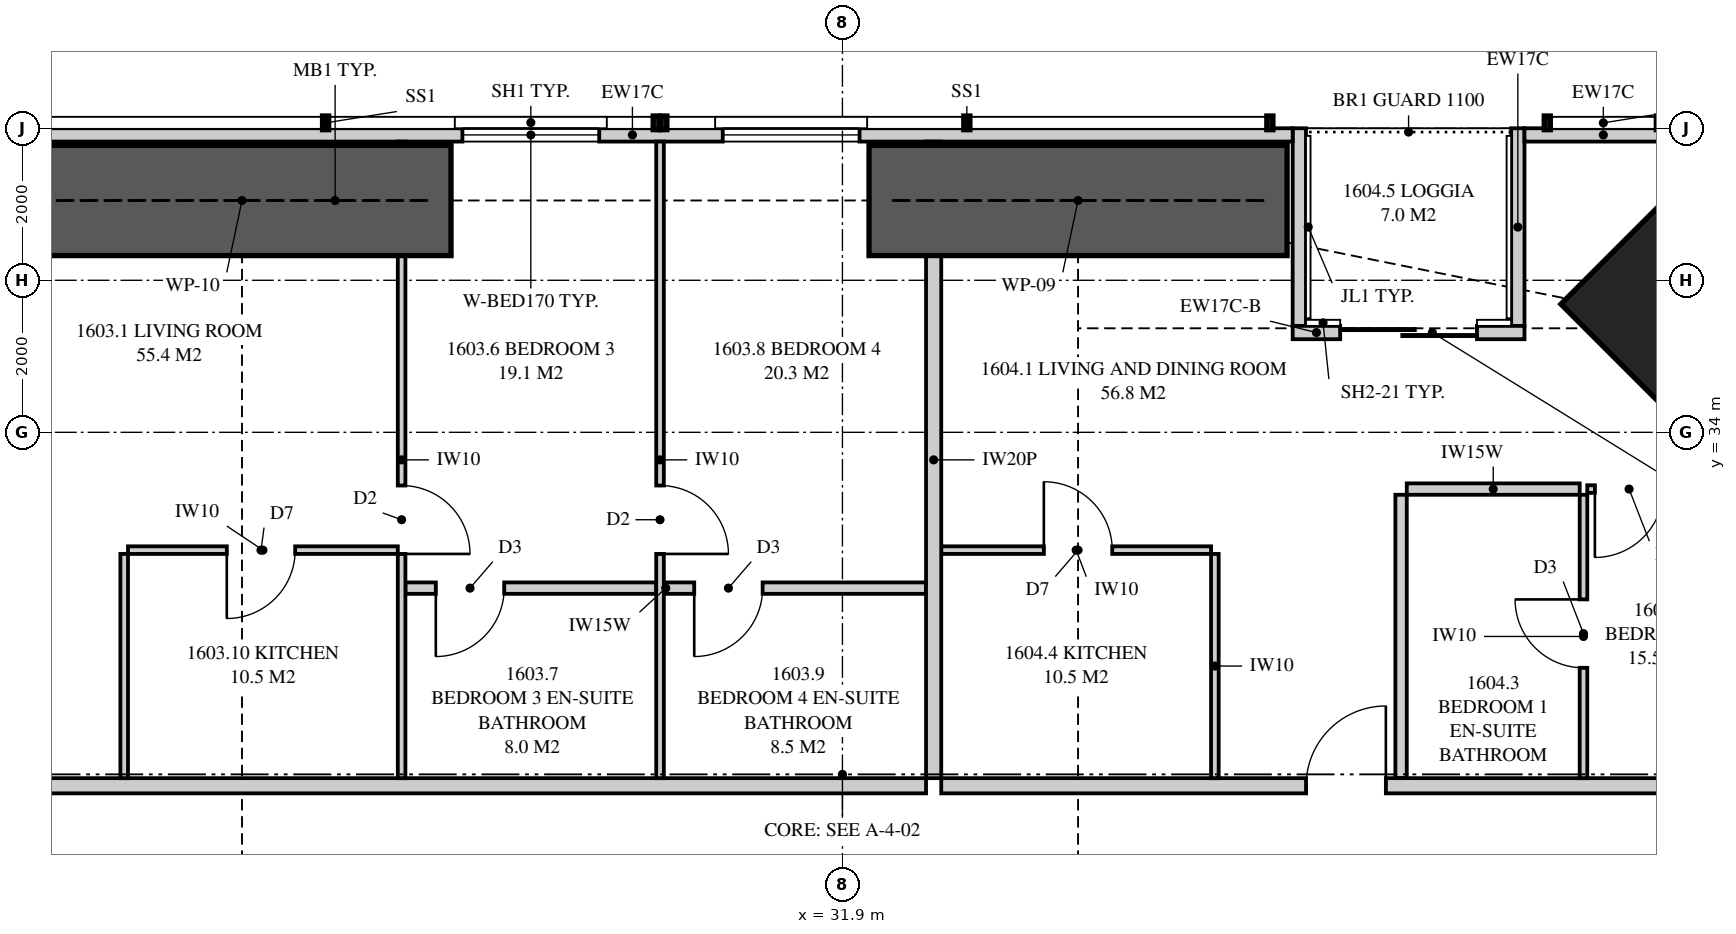
"""IFC4 building model, lengths in metres.
Left out: names, types, materials, properties, quantities, classifications, styles, units other than length and angle.
Written with IfcOpenShell. Run it as: python <this file> out.ifc"""

import sys

from ifc_helpers import new_model, si_unit, direction, frame, frame_2d, origin, origin_2d, place, context, subcontext, project, spatial, polyline, rectangle, outline, extrude, element, fill, save


model = new_model("IFC4")
c1 = context("Model", 3, precision=1e-05, world=origin(), true_north=direction((0.0, 1.0)))
c2 = subcontext(c1, "Body", "Model", "MODEL_VIEW")
j1 = project(units=[si_unit("LENGTHUNIT", "METRE"), si_unit("PLANEANGLEUNIT", "RADIAN")], contexts=[c1])
p1 = place(None, origin())
s1 = spatial("IfcSite", under=j1, at=p1, CompositionType="ELEMENT")
p2 = place(p1, origin())
s2 = spatial("IfcBuilding", under=s1, at=p2, CompositionType="ELEMENT")
p3 = place(p2, frame((0.0, 0.0, 61.2)))
s3 = spatial("IfcBuildingStorey", under=s2, at=p3, CompositionType="ELEMENT", Elevation=61.2)
p4 = place(p3, frame((43.369, 35.369, 0.0), z_axis=(0.0, 0.0, 1.0), x_axis=(-0.707106781187, -0.707106781187, 0.0)))
e1 = element("IfcColumn", 1, at=p4, inside=s3, PredefinedType="COLUMN", context=c2, shape_type="SweptSolid", body=[
    extrude(rectangle(XDim=2.4, YDim=3.3, at=origin_2d()), origin(), (0.0, 0.0, 1.0), 3.35),
])
p5 = place(p3, frame((42.949, 37.913, 0.0), z_axis=(0.0, 0.0, 1.0), x_axis=(-1.0, 0.0, 0.0)))
e2 = element("IfcWall", 2, at=p5, inside=s3, PredefinedType="SOLIDWALL", context=c2, shape_type="SweptSolid", body=[
    extrude(rectangle(XDim=2.075, YDim=0.175, at=frame_2d((1.038, 0.0))), origin(), (0.0, 0.0, 1.0), 3.11),
])
p6 = place(p3, frame((37.824, 37.913, 0.0), z_axis=(0.0, 0.0, 1.0), x_axis=(-1.0, 0.0, 0.0)))
e3 = element("IfcWall", 3, at=p6, inside=s3, PredefinedType="SOLIDWALL", context=c2, shape_type="SweptSolid", body=[
    extrude(outline(polyline([(0.0, 0.0), (17.374, 0.0), (17.374, 2.15), (2.824, 2.15), (2.824, 3.11), (2.668, 3.11), (2.668, 2.15), (2.62, 2.15), (2.62, 3.11), (0.0, 3.11), (0.0, 0.0)])), frame((0.0, 0.087, 0.0), z_axis=(0.0, -1.0, 0.0), x_axis=(1.0, 0.0, 0.0)), (0.0, 0.0, 1.0), 0.175),
])
p7 = place(p6, frame((5.699, 0.0, 0.4)))
e4 = element("IfcOpeningElement", 4, at=p7, cuts=e3, PredefinedType="OPENING", context=c2, shape_type="SweptSolid", body=[
    extrude(rectangle(XDim=1.8, YDim=1.7, at=frame_2d((0.9, 0.85))), frame((0.0, 0.097, 0.0), z_axis=(0.0, -1.0, 0.0), x_axis=(1.0, 0.0, 0.0)), (0.0, 0.0, 1.0), 0.195),
])
p8 = place(p6, frame((9.124, 0.0, 0.4)))
e5 = element("IfcOpeningElement", 5, at=p8, cuts=e3, PredefinedType="OPENING", context=c2, shape_type="SweptSolid", body=[
    extrude(rectangle(XDim=1.8, YDim=1.7, at=frame_2d((0.9, 0.85))), frame((0.0, 0.097, 0.0), z_axis=(0.0, -1.0, 0.0), x_axis=(1.0, 0.0, 0.0)), (0.0, 0.0, 1.0), 0.195),
])
p9 = place(p3, frame((40.874, 35.312, 0.0), z_axis=(0.0, 0.0, 1.0), x_axis=(-1.0, 0.0, 0.0)))
e6 = element("IfcWall", 6, at=p9, inside=s3, PredefinedType="SOLIDWALL", context=c2, shape_type="SweptSolid", body=[
    extrude(rectangle(XDim=2.425, YDim=0.175, at=frame_2d((1.212, 0.0))), origin(), (0.0, 0.0, 1.0), 2.15),
])
p10 = place(p9, frame((0.625, 0.0, 0.0)))
e7 = element("IfcOpeningElement", 7, at=p10, cuts=e6, PredefinedType="OPENING", context=c2, shape_type="SweptSolid", body=[
    extrude(rectangle(XDim=1.8, YDim=2.1, at=frame_2d((0.9, 1.05))), frame((0.0, 0.097, 0.0), z_axis=(0.0, -1.0, 0.0), x_axis=(1.0, 0.0, 0.0)), (0.0, 0.0, 1.0), 0.195),
])
p11 = place(p3, frame((38.449, 35.312, 0.0), z_axis=(0.0, 0.0, 1.0), x_axis=(-1.0, 0.0, 0.0)))
e8 = element("IfcWall", 8, at=p11, inside=s3, PredefinedType="SOLIDWALL", context=c2, shape_type="SweptSolid", body=[
    extrude(rectangle(XDim=0.625, YDim=0.175, at=frame_2d((0.312, 0.0))), origin(), (0.0, 0.0, 1.0), 2.51),
])
p12 = place(p3, frame((40.786, 38.0, 0.0), z_axis=(0.0, 0.0, 1.0), x_axis=(0.0, -1.0, 0.0)))
e9 = element("IfcWall", 9, at=p12, inside=s3, PredefinedType="SOLIDWALL", context=c2, shape_type="SweptSolid", body=[
    extrude(outline(polyline([(0.0, 0.0), (2.6, 0.0), (2.6, 2.15), (1.279, 2.15), (1.279, 3.11), (0.0, 3.11), (0.0, 0.0)])), frame((0.0, 0.087, 0.0), z_axis=(0.0, -1.0, 0.0), x_axis=(1.0, 0.0, 0.0)), (0.0, 0.0, 1.0), 0.175),
])
p13 = place(p3, frame((37.911, 38.0, 0.0), z_axis=(0.0, 0.0, 1.0), x_axis=(0.0, -1.0, 0.0)))
e10 = element("IfcWall", 10, at=p13, inside=s3, PredefinedType="SOLIDWALL", context=c2, shape_type="SweptSolid", body=[
    extrude(outline(polyline([(0.0, 0.0), (2.6, 0.0), (2.6, 2.51), (2.368, 2.51), (2.368, 2.15), (0.701, 2.15), (0.701, 3.11), (0.0, 3.11), (0.0, 0.0)])), frame((0.0, 0.087, 0.0), z_axis=(0.0, -1.0, 0.0), x_axis=(1.0, 0.0, 0.0)), (0.0, 0.0, 1.0), 0.175),
])
p14 = place(p3, frame((33.1, 37.825, 0.0), z_axis=(0.0, 0.0, 1.0), x_axis=(0.0, -1.0, 0.0)))
e11 = element("IfcWall", 11, at=p14, inside=s3, PredefinedType="PARTITIONING", context=c2, shape_type="SweptSolid", body=[
    extrude(outline(polyline([(0.529, 2.15), (0.0, 2.15), (0.0, 0.0), (0.529, 0.0), (0.529, 0.205), (1.021, 0.205), (1.021, 0.0), (8.375, 0.0), (8.375, 3.11), (1.685, 3.11), (1.685, 2.15), (1.021, 2.15), (1.021, 1.945), (0.529, 1.945), (0.529, 2.15)])), frame((0.0, 0.1, 0.0), z_axis=(0.0, -1.0, 0.0), x_axis=(1.0, 0.0, 0.0)), (0.0, 0.0, 1.0), 0.2),
])
p15 = place(p3, frame((17.725, 29.35, 0.0), z_axis=(0.0, 0.0, 1.0), x_axis=(1.0, 0.0, 0.0)))
e12 = element("IfcWall", 12, at=p15, inside=s3, PredefinedType="PARTITIONING", context=c2, shape_type="SweptSolid", body=[
    extrude(outline(polyline([(0.0, 0.0), (15.275, 0.0), (15.275, 3.11), (6.612, 3.11), (6.612, 2.541), (5.938, 2.541), (5.938, 3.11), (0.0, 3.11), (0.0, 0.0)])), frame((0.0, 0.1, 0.0), z_axis=(0.0, -1.0, 0.0), x_axis=(1.0, 0.0, 0.0)), (0.0, 0.0, 1.0), 0.2),
])
p16 = place(p15, frame((0.2, 0.0, 0.0)))
e13 = element("IfcOpeningElement", 13, at=p16, cuts=e12, PredefinedType="OPENING", context=c2, shape_type="SweptSolid", body=[
    extrude(rectangle(XDim=1.05, YDim=2.2, at=frame_2d((0.525, 1.1))), frame((0.0, 0.11, 0.0), z_axis=(0.0, -1.0, 0.0), x_axis=(1.0, 0.0, 0.0)), (0.0, 0.0, 1.0), 0.22),
])
p17 = place(p3, frame((26.1, 37.825, 0.0), z_axis=(0.0, 0.0, 1.0), x_axis=(0.0, -1.0, 0.0)))
e14 = element("IfcWall", 14, at=p17, inside=s3, PredefinedType="PARTITIONING", context=c2, shape_type="SweptSolid", body=[
    extrude(outline(polyline([(0.529, 2.15), (0.0, 2.15), (0.0, 0.0), (0.529, 0.0), (0.529, 0.034), (1.021, 0.034), (1.021, 0.0), (8.375, 0.0), (8.375, 3.11), (1.635, 3.11), (1.635, 2.15), (1.021, 2.15), (1.021, 2.116), (0.529, 2.116), (0.529, 2.15)])), frame((0.0, 0.05, 0.0), z_axis=(0.0, -1.0, 0.0), x_axis=(1.0, 0.0, 0.0)), (0.0, 0.0, 1.0), 0.1),
])
p18 = place(p17, frame((4.525, 0.0, 0.0)))
e15 = element("IfcOpeningElement", 15, at=p18, cuts=e14, PredefinedType="OPENING", context=c2, shape_type="SweptSolid", body=[
    extrude(rectangle(XDim=0.9, YDim=2.1, at=frame_2d((0.45, 1.05))), frame((0.0, 0.06, 0.0), z_axis=(0.0, -1.0, 0.0), x_axis=(1.0, 0.0, 0.0)), (0.0, 0.0, 1.0), 0.12),
])
p19 = place(p3, frame((29.5, 37.825, 0.0), z_axis=(0.0, 0.0, 1.0), x_axis=(0.0, -1.0, 0.0)))
e16 = element("IfcWall", 16, at=p19, inside=s3, PredefinedType="PARTITIONING", context=c2, shape_type="SweptSolid", body=[
    extrude(outline(polyline([(0.0, 0.0), (8.375, 0.0), (8.375, 3.11), (1.635, 3.11), (1.635, 2.15), (0.0, 2.15), (0.0, 3.11), (0.0, 0.0)])), frame((0.0, 0.05, 0.0), z_axis=(0.0, -1.0, 0.0), x_axis=(1.0, 0.0, 0.0)), (0.0, 0.0, 1.0), 0.1),
])
p20 = place(p19, frame((4.525, 0.0, 0.0)))
e17 = element("IfcOpeningElement", 17, at=p20, cuts=e16, PredefinedType="OPENING", context=c2, shape_type="SweptSolid", body=[
    extrude(rectangle(XDim=0.9, YDim=2.1, at=frame_2d((0.45, 1.05))), frame((0.0, 0.06, 0.0), z_axis=(0.0, -1.0, 0.0), x_axis=(1.0, 0.0, 0.0)), (0.0, 0.0, 1.0), 0.12),
])
p21 = place(p3, frame((26.15, 31.95, 0.0), z_axis=(0.0, 0.0, 1.0), x_axis=(1.0, 0.0, 0.0)))
e18 = element("IfcWall", 18, at=p21, inside=s3, PredefinedType="PLUMBINGWALL", context=c2, shape_type="SweptSolid", body=[
    extrude(rectangle(XDim=3.3, YDim=0.15, at=frame_2d((1.65, 0.0))), origin(), (0.0, 0.0, 1.0), 3.11),
])
p22 = place(p21, frame((0.4, 0.0, 0.0)))
e19 = element("IfcOpeningElement", 19, at=p22, cuts=e18, PredefinedType="OPENING", context=c2, shape_type="SweptSolid", body=[
    extrude(rectangle(XDim=0.9, YDim=2.1, at=frame_2d((0.45, 1.05))), frame((0.0, 0.085, 0.0), z_axis=(0.0, -1.0, 0.0), x_axis=(1.0, 0.0, 0.0)), (0.0, 0.0, 1.0), 0.17),
])
p23 = place(p3, frame((29.55, 31.95, 0.0), z_axis=(0.0, 0.0, 1.0), x_axis=(1.0, 0.0, 0.0)))
e20 = element("IfcWall", 20, at=p23, inside=s3, PredefinedType="PLUMBINGWALL", context=c2, shape_type="SweptSolid", body=[
    extrude(rectangle(XDim=3.45, YDim=0.15, at=frame_2d((1.725, 0.0))), origin(), (0.0, 0.0, 1.0), 3.11),
])
p24 = place(p23, frame((0.4, 0.0, 0.0)))
e21 = element("IfcOpeningElement", 21, at=p24, cuts=e20, PredefinedType="OPENING", context=c2, shape_type="SweptSolid", body=[
    extrude(rectangle(XDim=0.9, YDim=2.1, at=frame_2d((0.45, 1.05))), frame((0.0, 0.085, 0.0), z_axis=(0.0, -1.0, 0.0), x_axis=(1.0, 0.0, 0.0)), (0.0, 0.0, 1.0), 0.17),
])
p25 = place(p3, frame((22.5, 32.45, 0.0), z_axis=(0.0, 0.0, 1.0), x_axis=(1.0, 0.0, 0.0)))
e22 = element("IfcWall", 22, at=p25, inside=s3, PredefinedType="PARTITIONING", context=c2, shape_type="SweptSolid", body=[
    extrude(outline(polyline([(0.0, 0.0), (3.55, 0.0), (3.55, 3.11), (1.787, 3.11), (1.787, 2.541), (1.213, 2.541), (1.213, 3.11), (0.0, 3.11), (0.0, 0.0)])), frame((0.0, 0.05, 0.0), z_axis=(0.0, -1.0, 0.0), x_axis=(1.0, 0.0, 0.0)), (0.0, 0.0, 1.0), 0.1),
])
p26 = place(p25, frame((1.3, 0.0, 0.0)))
e23 = element("IfcOpeningElement", 23, at=p26, cuts=e22, PredefinedType="OPENING", context=c2, shape_type="SweptSolid", body=[
    extrude(rectangle(XDim=0.9, YDim=2.1, at=frame_2d((0.45, 1.05))), frame((0.0, 0.06, 0.0), z_axis=(0.0, -1.0, 0.0), x_axis=(1.0, 0.0, 0.0)), (0.0, 0.0, 1.0), 0.12),
])
p27 = place(p3, frame((22.45, 32.4, 0.0), z_axis=(0.0, 0.0, 1.0), x_axis=(0.0, -1.0, 0.0)))
e24 = element("IfcWall", 24, at=p27, inside=s3, PredefinedType="PARTITIONING", context=c2, shape_type="SweptSolid", body=[
    extrude(rectangle(XDim=2.95, YDim=0.1, at=frame_2d((1.475, 0.0))), origin(), (0.0, 0.0, 1.0), 3.11),
])
p28 = place(p3, frame((33.2, 29.35, 0.0), z_axis=(0.0, 0.0, 1.0), x_axis=(1.0, 0.0, 0.0)))
e25 = element("IfcWall", 25, at=p28, inside=s3, PredefinedType="PARTITIONING", context=c2, shape_type="SweptSolid", body=[
    extrude(outline(polyline([(0.0, 0.0), (12.8, 0.0), (12.8, 3.11), (12.066, 3.11), (12.066, 2.15), (10.223, 2.15), (10.223, 3.11), (2.137, 3.11), (2.137, 2.541), (1.463, 2.541), (1.463, 3.11), (0.0, 3.11), (0.0, 0.0)])), frame((0.0, 0.1, 0.0), z_axis=(0.0, -1.0, 0.0), x_axis=(1.0, 0.0, 0.0)), (0.0, 0.0, 1.0), 0.2),
])
p29 = place(p28, frame((4.8, 0.0, 0.0)))
e26 = element("IfcOpeningElement", 26, at=p29, cuts=e25, PredefinedType="OPENING", context=c2, shape_type="SweptSolid", body=[
    extrude(rectangle(XDim=1.05, YDim=2.2, at=frame_2d((0.525, 1.1))), frame((0.0, 0.11, 0.0), z_axis=(0.0, -1.0, 0.0), x_axis=(1.0, 0.0, 0.0)), (0.0, 0.0, 1.0), 0.22),
])
p30 = place(p3, frame((41.65, 33.178, 0.0), z_axis=(0.0, 0.0, 1.0), x_axis=(0.0, -1.0, 0.0)))
e27 = element("IfcWall", 27, at=p30, inside=s3, PredefinedType="PARTITIONING", context=c2, shape_type="SweptSolid", body=[
    extrude(rectangle(XDim=3.728, YDim=0.1, at=frame_2d((1.864, 0.0))), origin(), (0.0, 0.0, 1.0), 3.11),
])
p31 = place(p30, frame((1.377, 0.0, 0.0)))
e28 = element("IfcOpeningElement", 28, at=p31, cuts=e27, PredefinedType="OPENING", context=c2, shape_type="SweptSolid", body=[
    extrude(rectangle(XDim=0.9, YDim=2.1, at=frame_2d((0.45, 1.05))), frame((0.0, 0.06, 0.0), z_axis=(0.0, -1.0, 0.0), x_axis=(1.0, 0.0, 0.0)), (0.0, 0.0, 1.0), 0.12),
])
p32 = place(p3, frame((41.7, 33.253, 0.0), z_axis=(0.0, 0.0, 1.0), x_axis=(1.0, 0.0, 0.0)))
e29 = element("IfcWall", 29, at=p32, inside=s3, PredefinedType="PARTITIONING", context=c2, shape_type="SweptSolid", body=[
    extrude(outline(polyline([(0.0, 0.0), (4.3, 0.0), (4.3, 3.11), (2.883, 3.11), (2.883, 2.15), (1.14, 2.15), (1.14, 3.11), (0.0, 3.11), (0.0, 0.0)])), frame((0.0, 0.05, 0.0), z_axis=(0.0, -1.0, 0.0), x_axis=(1.0, 0.0, 0.0)), (0.0, 0.0, 1.0), 0.1),
])
p33 = place(p32, frame((0.1, 0.0, 0.0)))
e30 = element("IfcOpeningElement", 30, at=p33, cuts=e29, PredefinedType="OPENING", context=c2, shape_type="SweptSolid", body=[
    extrude(rectangle(XDim=0.9, YDim=2.1, at=frame_2d((0.45, 1.05))), frame((0.0, 0.06, 0.0), z_axis=(0.0, -1.0, 0.0), x_axis=(1.0, 0.0, 0.0)), (0.0, 0.0, 1.0), 0.12),
])
p34 = place(p3, frame((39.325, 33.253, 0.0), z_axis=(0.0, 0.0, 1.0), x_axis=(1.0, 0.0, 0.0)))
e31 = element("IfcWall", 31, at=p34, inside=s3, PredefinedType="PLUMBINGWALL", context=c2, shape_type="SweptSolid", body=[
    extrude(rectangle(XDim=2.275, YDim=0.15, at=frame_2d((1.138, 0.0))), origin(), (0.0, 0.0, 1.0), 3.11),
])
p35 = place(p3, frame((39.25, 33.178, 0.0), z_axis=(0.0, 0.0, 1.0), x_axis=(0.0, -1.0, 0.0)))
e32 = element("IfcWall", 32, at=p35, inside=s3, PredefinedType="PLUMBINGWALL", context=c2, shape_type="SweptSolid", body=[
    extrude(rectangle(XDim=3.728, YDim=0.15, at=frame_2d((1.864, 0.0))), origin(), (0.0, 0.0, 1.0), 3.11),
])
p36 = place(p3, frame((33.2, 32.45, 0.0), z_axis=(0.0, 0.0, 1.0), x_axis=(1.0, 0.0, 0.0)))
e33 = element("IfcWall", 33, at=p36, inside=s3, PredefinedType="PARTITIONING", context=c2, shape_type="SweptSolid", body=[
    extrude(outline(polyline([(0.0, 0.0), (3.55, 0.0), (3.55, 3.11), (2.087, 3.11), (2.087, 2.541), (1.513, 2.541), (1.513, 3.11), (0.0, 3.11), (0.0, 0.0)])), frame((0.0, 0.05, 0.0), z_axis=(0.0, -1.0, 0.0), x_axis=(1.0, 0.0, 0.0)), (0.0, 0.0, 1.0), 0.1),
])
p37 = place(p36, frame((1.35, 0.0, 0.0)))
e34 = element("IfcOpeningElement", 34, at=p37, cuts=e33, PredefinedType="OPENING", context=c2, shape_type="SweptSolid", body=[
    extrude(rectangle(XDim=0.9, YDim=2.1, at=frame_2d((0.45, 1.05))), frame((0.0, 0.06, 0.0), z_axis=(0.0, -1.0, 0.0), x_axis=(1.0, 0.0, 0.0)), (0.0, 0.0, 1.0), 0.12),
])
p38 = place(p3, frame((36.8, 32.4, 0.0), z_axis=(0.0, 0.0, 1.0), x_axis=(0.0, -1.0, 0.0)))
e35 = element("IfcWall", 35, at=p38, inside=s3, PredefinedType="PARTITIONING", context=c2, shape_type="SweptSolid", body=[
    extrude(rectangle(XDim=2.95, YDim=0.1, at=frame_2d((1.475, 0.0))), origin(), (0.0, 0.0, 1.0), 3.11),
])
for number, where, z_axis, x_axis in (
    (36, (32.25, 37.05, 0.0), (0.0, 0.0, 1.0), (1.0, 0.0, 0.0)),
    (37, (21.25, 37.05, 0.0), (0.0, 0.0, 1.0), (1.0, 0.0, 0.0)),
):
    element("IfcWall", number, at=place(p3, frame(where, z_axis=z_axis, x_axis=x_axis)), inside=s3, PredefinedType="SHEAR", context=c2, shape_type="SweptSolid", body=[
        extrude(rectangle(XDim=5.5, YDim=1.45, at=frame_2d((2.75, 0.0))), origin(), (0.0, 0.0, 1.0), 3.35),
    ])
p39 = place(p10, origin())
e38 = element("IfcDoor", 38, at=p39, inside=s3, OperationType="SLIDING_TO_LEFT", PredefinedType="DOOR", context=c2, shape_type="SweptSolid", body=[
    extrude(rectangle(XDim=1.8, YDim=2.1, at=frame_2d((0.9, 1.05))), frame((0.0, 0.025, 0.0), z_axis=(0.0, -1.0, 0.0), x_axis=(1.0, 0.0, 0.0)), (0.0, 0.0, 1.0), 0.05),
])
fill(e7, e38)
p40 = place(p7, origin())
e39 = element("IfcWindow", 39, at=p40, inside=s3, PartitioningType="SINGLE_PANEL", PredefinedType="WINDOW", context=c2, shape_type="SweptSolid", body=[
    extrude(rectangle(XDim=1.8, YDim=1.7, at=frame_2d((0.9, 0.85))), frame((0.0, 0.03, 0.0), z_axis=(0.0, -1.0, 0.0), x_axis=(1.0, 0.0, 0.0)), (0.0, 0.0, 1.0), 0.06),
])
fill(e4, e39)
p41 = place(p8, origin())
e40 = element("IfcWindow", 40, at=p41, inside=s3, PartitioningType="SINGLE_PANEL", PredefinedType="WINDOW", context=c2, shape_type="SweptSolid", body=[
    extrude(rectangle(XDim=1.8, YDim=1.7, at=frame_2d((0.9, 0.85))), frame((0.0, 0.03, 0.0), z_axis=(0.0, -1.0, 0.0), x_axis=(1.0, 0.0, 0.0)), (0.0, 0.0, 1.0), 0.06),
])
fill(e5, e40)
p42 = place(p18, origin())
e41 = element("IfcDoor", 41, at=p42, inside=s3, OperationType="SINGLE_SWING_RIGHT", PredefinedType="DOOR", context=c2, shape_type="SweptSolid", body=[
    extrude(rectangle(XDim=0.9, YDim=2.1, at=frame_2d((0.45, 1.05))), frame((0.0, 0.025, 0.0), z_axis=(0.0, -1.0, 0.0), x_axis=(1.0, 0.0, 0.0)), (0.0, 0.0, 1.0), 0.05),
])
fill(e15, e41)
p43 = place(p22, frame((0.9, 0.0, 0.0), z_axis=(0.0, 0.0, 1.0), x_axis=(-1.0, 0.0, 0.0)))
e42 = element("IfcDoor", 42, at=p43, inside=s3, OperationType="SINGLE_SWING_RIGHT", PredefinedType="DOOR", context=c2, shape_type="SweptSolid", body=[
    extrude(rectangle(XDim=0.9, YDim=2.1, at=frame_2d((0.45, 1.05))), frame((0.0, 0.025, 0.0), z_axis=(0.0, -1.0, 0.0), x_axis=(1.0, 0.0, 0.0)), (0.0, 0.0, 1.0), 0.05),
])
fill(e19, e42)
p44 = place(p20, origin())
e43 = element("IfcDoor", 43, at=p44, inside=s3, OperationType="SINGLE_SWING_RIGHT", PredefinedType="DOOR", context=c2, shape_type="SweptSolid", body=[
    extrude(rectangle(XDim=0.9, YDim=2.1, at=frame_2d((0.45, 1.05))), frame((0.0, 0.025, 0.0), z_axis=(0.0, -1.0, 0.0), x_axis=(1.0, 0.0, 0.0)), (0.0, 0.0, 1.0), 0.05),
])
fill(e17, e43)
p45 = place(p24, frame((0.9, 0.0, 0.0), z_axis=(0.0, 0.0, 1.0), x_axis=(-1.0, 0.0, 0.0)))
e44 = element("IfcDoor", 44, at=p45, inside=s3, OperationType="SINGLE_SWING_RIGHT", PredefinedType="DOOR", context=c2, shape_type="SweptSolid", body=[
    extrude(rectangle(XDim=0.9, YDim=2.1, at=frame_2d((0.45, 1.05))), frame((0.0, 0.025, 0.0), z_axis=(0.0, -1.0, 0.0), x_axis=(1.0, 0.0, 0.0)), (0.0, 0.0, 1.0), 0.05),
])
fill(e21, e44)
p46 = place(p26, frame((0.9, 0.0, 0.0), z_axis=(0.0, 0.0, 1.0), x_axis=(-1.0, 0.0, 0.0)))
e45 = element("IfcDoor", 45, at=p46, inside=s3, OperationType="SINGLE_SWING_RIGHT", PredefinedType="DOOR", context=c2, shape_type="SweptSolid", body=[
    extrude(rectangle(XDim=0.9, YDim=2.1, at=frame_2d((0.45, 1.05))), frame((0.0, 0.025, 0.0), z_axis=(0.0, -1.0, 0.0), x_axis=(1.0, 0.0, 0.0)), (0.0, 0.0, 1.0), 0.05),
])
fill(e23, e45)
p47 = place(p29, origin())
e46 = element("IfcDoor", 46, at=p47, inside=s3, OperationType="SINGLE_SWING_RIGHT", PredefinedType="DOOR", context=c2, shape_type="SweptSolid", body=[
    extrude(rectangle(XDim=1.05, YDim=2.2, at=frame_2d((0.525, 1.1))), frame((0.0, 0.025, 0.0), z_axis=(0.0, -1.0, 0.0), x_axis=(1.0, 0.0, 0.0)), (0.0, 0.0, 1.0), 0.05),
])
fill(e26, e46)
p48 = place(p33, frame((0.9, 0.0, 0.0), z_axis=(0.0, 0.0, 1.0), x_axis=(-1.0, 0.0, 0.0)))
e47 = element("IfcDoor", 47, at=p48, inside=s3, OperationType="SINGLE_SWING_RIGHT", PredefinedType="DOOR", context=c2, shape_type="SweptSolid", body=[
    extrude(rectangle(XDim=0.9, YDim=2.1, at=frame_2d((0.45, 1.05))), frame((0.0, 0.025, 0.0), z_axis=(0.0, -1.0, 0.0), x_axis=(1.0, 0.0, 0.0)), (0.0, 0.0, 1.0), 0.05),
])
fill(e30, e47)
p49 = place(p31, frame((0.9, 0.0, 0.0), z_axis=(0.0, 0.0, 1.0), x_axis=(-1.0, 0.0, 0.0)))
e48 = element("IfcDoor", 48, at=p49, inside=s3, OperationType="SINGLE_SWING_RIGHT", PredefinedType="DOOR", context=c2, shape_type="SweptSolid", body=[
    extrude(rectangle(XDim=0.9, YDim=2.1, at=frame_2d((0.45, 1.05))), frame((0.0, 0.025, 0.0), z_axis=(0.0, -1.0, 0.0), x_axis=(1.0, 0.0, 0.0)), (0.0, 0.0, 1.0), 0.05),
])
fill(e28, e48)
p50 = place(p37, origin())
e49 = element("IfcDoor", 49, at=p50, inside=s3, OperationType="SINGLE_SWING_LEFT", PredefinedType="DOOR", context=c2, shape_type="SweptSolid", body=[
    extrude(rectangle(XDim=0.9, YDim=2.1, at=frame_2d((0.45, 1.05))), frame((0.0, 0.025, 0.0), z_axis=(0.0, -1.0, 0.0), x_axis=(1.0, 0.0, 0.0)), (0.0, 0.0, 1.0), 0.05),
])
fill(e34, e49)
save(model, sys.argv[1])
